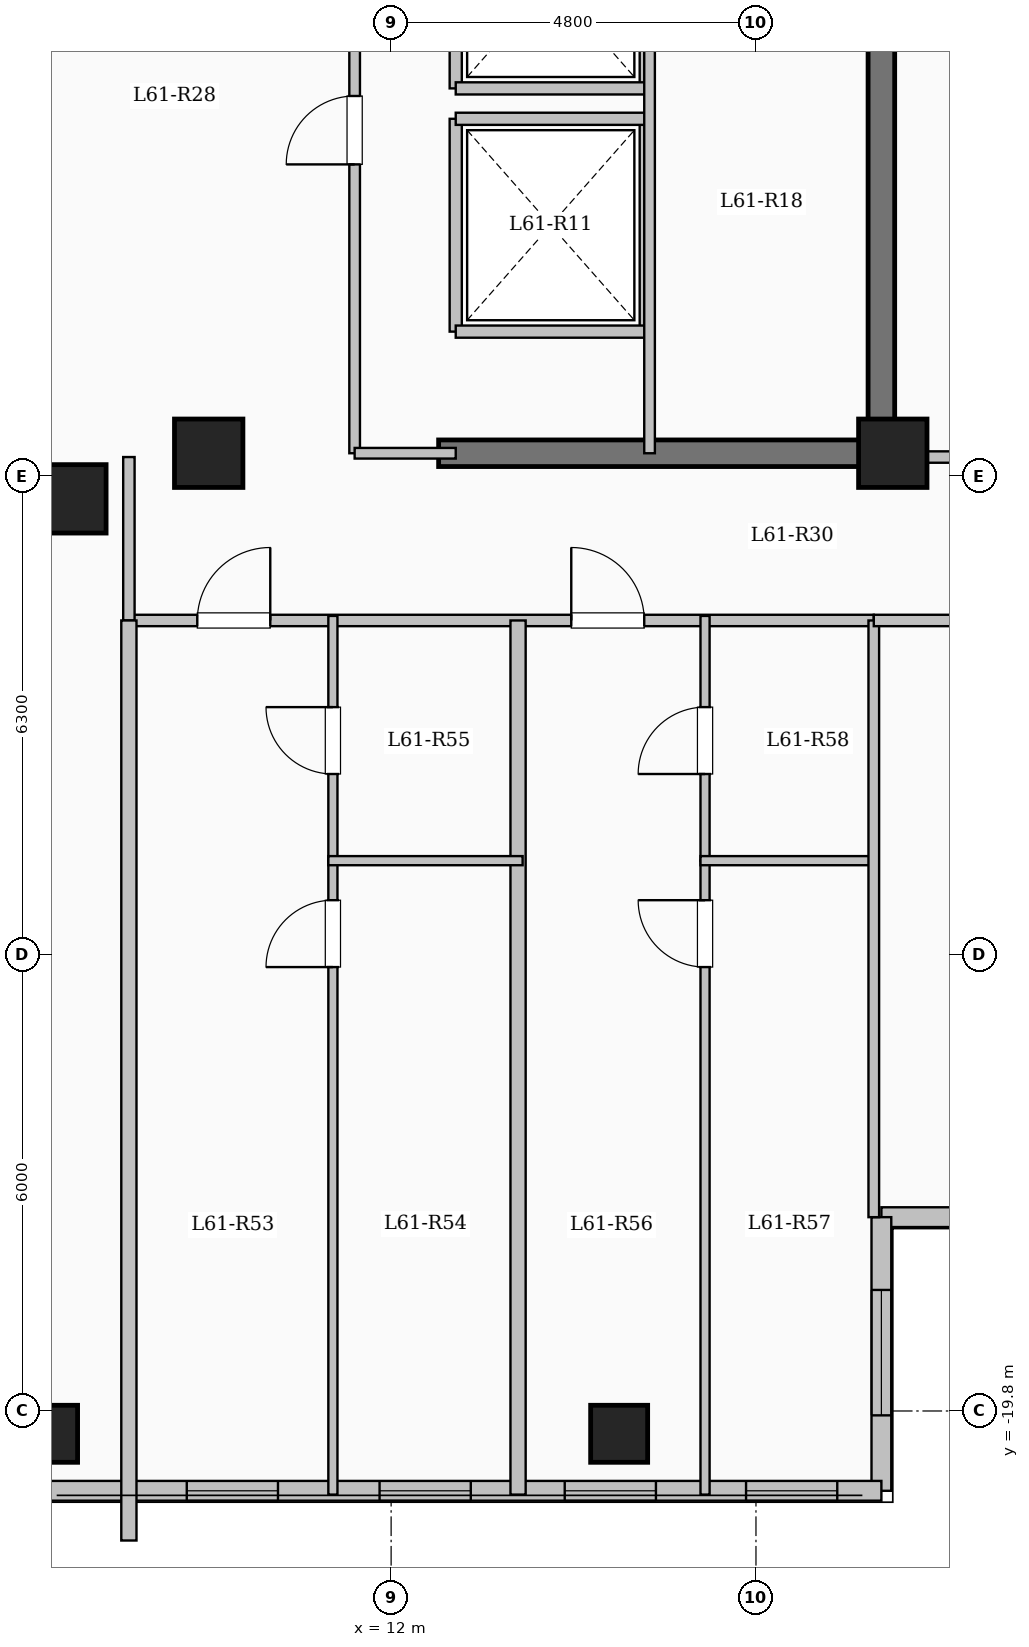
"""IFC4 building model, lengths in metres.
Left out: names, types, materials, properties, quantities, classifications, styles, units other than length and angle.
Written with IfcOpenShell. Run it as: python <this file> out.ifc"""

import sys

from ifc_helpers import new_model, si_unit, direction, frame, frame_2d, origin, origin_2d, place, context, subcontext, project, spatial, rectangle, extrude, element, fill, save


model = new_model("IFC4")
c1 = context("Model", 3, precision=1e-05, world=origin(), true_north=direction((0.0, 1.0)))
c2 = subcontext(c1, "Body", "Model", "MODEL_VIEW")
j1 = project(units=[si_unit("LENGTHUNIT", "METRE"), si_unit("PLANEANGLEUNIT", "RADIAN")], contexts=[c1])
p1 = place(None, origin())
s1 = spatial("IfcSite", under=j1, at=p1, CompositionType="ELEMENT")
p2 = place(p1, origin())
s2 = spatial("IfcBuilding", under=s1, at=p2, CompositionType="ELEMENT")
p3 = place(p2, frame((0.0, 0.0, 223.75)))
s3 = spatial("IfcBuildingStorey", under=s2, at=p3, CompositionType="ELEMENT", Elevation=223.75)
for number, where, z_axis, x_axis in (
    (1, (7.8, -7.8, 0.0), (0.0, 0.0, 1.0), (1.0, 0.0, 0.0)),
    (2, (9.6, -7.2, 0.0), (0.0, 0.0, 1.0), (1.0, 0.0, 0.0)),
    (3, (18.6, -7.2, 0.0), (0.0, 0.0, 1.0), (1.0, 0.0, 0.0)),
):
    element("IfcColumn", number, at=place(p3, frame(where, z_axis=z_axis, x_axis=x_axis)), inside=s3, PredefinedType="COLUMN", context=c2, shape_type="SweptSolid", body=[
        extrude(rectangle(XDim=0.9, YDim=0.9, at=origin_2d()), origin(), (0.0, 0.0, 1.0), 3.35),
    ])
for number, where, z_axis, x_axis in (
    (4, (7.5, -20.1, 0.0), (0.0, 0.0, 1.0), (1.0, 0.0, 0.0)),
    (5, (15.0, -20.1, 0.0), (0.0, 0.0, 1.0), (1.0, 0.0, 0.0)),
):
    element("IfcColumn", number, at=place(p3, frame(where, z_axis=z_axis, x_axis=x_axis)), inside=s3, PredefinedType="COLUMN", context=c2, shape_type="SweptSolid", body=[
        extrude(rectangle(XDim=0.75, YDim=0.75, at=origin_2d()), origin(), (0.0, 0.0, 1.0), 3.35),
    ])
p4 = place(p3, frame((23.55, -17.25, 0.0), z_axis=(0.0, 0.0, 1.0), x_axis=(-1.0, 0.0, 0.0)))
e6 = element("IfcWall", 6, at=p4, inside=s3, PredefinedType="SOLIDWALL", context=c2, shape_type="SweptSolid", body=[
    extrude(rectangle(XDim=5.1, YDim=0.26, at=frame_2d((2.55, 0.0))), origin(), (0.0, 0.0, 1.0), 3.05),
])
p5 = place(p4, frame((1.475, 0.0, 0.9)))
e7 = element("IfcOpeningElement", 7, at=p5, cuts=e6, PredefinedType="OPENING", context=c2, shape_type="SweptSolid", body=[
    extrude(rectangle(XDim=2.2, YDim=1.75, at=frame_2d((1.1, 0.875))), frame((0.0, 0.14, 0.0), z_axis=(0.0, -1.0, 0.0), x_axis=(1.0, 0.0, 0.0)), (0.0, 0.0, 1.0), 0.28),
])
p6 = place(p3, frame((18.45, -17.25, 0.0), z_axis=(0.0, 0.0, 1.0), x_axis=(0.0, -1.0, 0.0)))
e8 = element("IfcWall", 8, at=p6, inside=s3, PredefinedType="SOLIDWALL", context=c2, shape_type="SweptSolid", body=[
    extrude(rectangle(XDim=3.6, YDim=0.26, at=frame_2d((1.8, 0.0))), origin(), (0.0, 0.0, 1.0), 3.05),
])
p7 = place(p6, frame((0.958, 0.0, 0.9)))
e9 = element("IfcOpeningElement", 9, at=p7, cuts=e8, PredefinedType="OPENING", context=c2, shape_type="SweptSolid", body=[
    extrude(rectangle(XDim=1.65, YDim=1.6, at=frame_2d((0.825, 0.8))), frame((0.0, 0.14, 0.0), z_axis=(0.0, -1.0, 0.0), x_axis=(1.0, 0.0, 0.0)), (0.0, 0.0, 1.0), 0.28),
])
p8 = place(p3, frame((18.45, -20.85, 0.0), z_axis=(0.0, 0.0, 1.0), x_axis=(-1.0, 0.0, 0.0)))
e10 = element("IfcWall", 10, at=p8, inside=s3, PredefinedType="SOLIDWALL", context=c2, shape_type="SweptSolid", body=[
    extrude(rectangle(XDim=11.1, YDim=0.26, at=frame_2d((5.55, 0.0))), origin(), (0.0, 0.0, 1.0), 3.05),
])
p9 = place(p8, frame((0.581, 0.0, 0.95)))
e11 = element("IfcOpeningElement", 11, at=p9, cuts=e10, PredefinedType="OPENING", context=c2, shape_type="SweptSolid", body=[
    extrude(rectangle(XDim=1.2, YDim=1.5, at=frame_2d((0.6, 0.75))), frame((0.0, 0.14, 0.0), z_axis=(0.0, -1.0, 0.0), x_axis=(1.0, 0.0, 0.0)), (0.0, 0.0, 1.0), 0.28),
])
p10 = place(p8, frame((2.966, 0.0, 0.95)))
e12 = element("IfcOpeningElement", 12, at=p10, cuts=e10, PredefinedType="OPENING", context=c2, shape_type="SweptSolid", body=[
    extrude(rectangle(XDim=1.2, YDim=1.5, at=frame_2d((0.6, 0.75))), frame((0.0, 0.14, 0.0), z_axis=(0.0, -1.0, 0.0), x_axis=(1.0, 0.0, 0.0)), (0.0, 0.0, 1.0), 0.28),
])
p11 = place(p8, frame((5.402, 0.0, 0.95)))
e13 = element("IfcOpeningElement", 13, at=p11, cuts=e10, PredefinedType="OPENING", context=c2, shape_type="SweptSolid", body=[
    extrude(rectangle(XDim=1.2, YDim=1.5, at=frame_2d((0.6, 0.75))), frame((0.0, 0.14, 0.0), z_axis=(0.0, -1.0, 0.0), x_axis=(1.0, 0.0, 0.0)), (0.0, 0.0, 1.0), 0.28),
])
p12 = place(p8, frame((7.938, 0.0, 0.95)))
e14 = element("IfcOpeningElement", 14, at=p12, cuts=e10, PredefinedType="OPENING", context=c2, shape_type="SweptSolid", body=[
    extrude(rectangle(XDim=1.2, YDim=1.5, at=frame_2d((0.6, 0.75))), frame((0.0, 0.14, 0.0), z_axis=(0.0, -1.0, 0.0), x_axis=(1.0, 0.0, 0.0)), (0.0, 0.0, 1.0), 0.28),
])
for number, where, z_axis, x_axis in (
    (15, (12.85, -5.6, 0.0), (0.0, 0.0, 1.0), (0.0, 1.0, 0.0)),
    (16, (15.35, -5.6, 0.0), (0.0, 0.0, 1.0), (0.0, 1.0, 0.0)),
):
    element("IfcWall", number, at=place(p3, frame(where, z_axis=z_axis, x_axis=x_axis)), inside=s3, PredefinedType="SOLIDWALL", context=c2, shape_type="SweptSolid", body=[
        extrude(rectangle(XDim=2.8, YDim=0.16, at=frame_2d((1.4, 0.0))), origin(), (0.0, 0.0, 1.0), 3.05),
    ])
for number, where, z_axis, x_axis in (
    (17, (12.85, -5.6, 0.0), (0.0, 0.0, 1.0), (1.0, 0.0, 0.0)),
    (18, (12.85, -2.8, 0.0), (0.0, 0.0, 1.0), (1.0, 0.0, 0.0)),
):
    element("IfcWall", number, at=place(p3, frame(where, z_axis=z_axis, x_axis=x_axis)), inside=s3, PredefinedType="SOLIDWALL", context=c2, shape_type="SweptSolid", body=[
        extrude(rectangle(XDim=2.5, YDim=0.16, at=frame_2d((1.25, 0.0))), origin(), (0.0, 0.0, 1.0), 3.05),
    ])
for number, where, z_axis, x_axis in (
    (19, (12.85, -2.4, 0.0), (0.0, 0.0, 1.0), (0.0, 1.0, 0.0)),
    (20, (15.35, -2.4, 0.0), (0.0, 0.0, 1.0), (0.0, 1.0, 0.0)),
):
    element("IfcWall", number, at=place(p3, frame(where, z_axis=z_axis, x_axis=x_axis)), inside=s3, PredefinedType="SOLIDWALL", context=c2, shape_type="SweptSolid", body=[
        extrude(rectangle(XDim=2.8, YDim=0.16, at=frame_2d((1.4, 0.0))), origin(), (0.0, 0.0, 1.0), 3.05),
    ])
p13 = place(p3, frame((12.85, -2.4, 0.0), z_axis=(0.0, 0.0, 1.0), x_axis=(1.0, 0.0, 0.0)))
e21 = element("IfcWall", 21, at=p13, inside=s3, PredefinedType="SOLIDWALL", context=c2, shape_type="SweptSolid", body=[
    extrude(rectangle(XDim=2.5, YDim=0.16, at=frame_2d((1.25, 0.0))), origin(), (0.0, 0.0, 1.0), 3.05),
])
p14 = place(p3, frame((18.45, -7.375, 0.0), z_axis=(0.0, 0.0, 1.0), x_axis=(0.0, 1.0, 0.0)))
e22 = element("IfcWall", 22, at=p14, inside=s3, PredefinedType="SHEAR", context=c2, shape_type="SweptSolid", body=[
    extrude(rectangle(XDim=14.05, YDim=0.35, at=frame_2d((7.025, 0.0))), origin(), (0.0, 0.0, 1.0), 3.35),
])
p15 = place(p3, frame((12.625, -7.2, 0.0), z_axis=(0.0, 0.0, 1.0), x_axis=(1.0, 0.0, 0.0)))
e23 = element("IfcWall", 23, at=p15, inside=s3, PredefinedType="SHEAR", context=c2, shape_type="SweptSolid", body=[
    extrude(rectangle(XDim=6.0, YDim=0.35, at=frame_2d((3.0, 0.0))), origin(), (0.0, 0.0, 1.0), 3.35),
])
p16 = place(p3, frame((15.4, -7.2, 0.0), z_axis=(0.0, 0.0, 1.0), x_axis=(0.0, 1.0, 0.0)))
e24 = element("IfcWall", 24, at=p16, inside=s3, PredefinedType="PARTITIONING", context=c2, shape_type="SweptSolid", body=[
    extrude(rectangle(XDim=10.45, YDim=0.14, at=frame_2d((5.225, 0.0))), origin(), (0.0, 0.0, 1.0), 3.05),
])
p17 = place(p16, frame((9.25, 0.0, 0.0)))
e25 = element("IfcOpeningElement", 25, at=p17, cuts=e24, PredefinedType="OPENING", context=c2, shape_type="SweptSolid", body=[
    extrude(rectangle(XDim=0.9, YDim=2.08, at=frame_2d((0.45, 1.04))), frame((0.0, 0.08, 0.0), z_axis=(0.0, -1.0, 0.0), x_axis=(1.0, 0.0, 0.0)), (0.0, 0.0, 1.0), 0.16),
])
p18 = place(p3, frame((11.52, -7.2, 0.0), z_axis=(0.0, 0.0, 1.0), x_axis=(0.0, 1.0, 0.0)))
e26 = element("IfcWall", 26, at=p18, inside=s3, PredefinedType="PARTITIONING", context=c2, shape_type="SweptSolid", body=[
    extrude(rectangle(XDim=9.12, YDim=0.14, at=frame_2d((4.56, 0.0))), origin(), (0.0, 0.0, 1.0), 3.05),
])
p19 = place(p18, frame((3.8, 0.0, 0.0)))
e27 = element("IfcOpeningElement", 27, at=p19, cuts=e26, PredefinedType="OPENING", context=c2, shape_type="SweptSolid", body=[
    extrude(rectangle(XDim=0.9, YDim=2.08, at=frame_2d((0.45, 1.04))), frame((0.0, 0.08, 0.0), z_axis=(0.0, -1.0, 0.0), x_axis=(1.0, 0.0, 0.0)), (0.0, 0.0, 1.0), 0.16),
])
p20 = place(p3, frame((11.52, -7.2, 0.0), z_axis=(0.0, 0.0, 1.0), x_axis=(1.0, 0.0, 0.0)))
e28 = element("IfcWall", 28, at=p20, inside=s3, PredefinedType="PARTITIONING", context=c2, shape_type="SweptSolid", body=[
    extrude(rectangle(XDim=1.33, YDim=0.14, at=frame_2d((0.665, 0.0))), origin(), (0.0, 0.0, 1.0), 2.22),
])
p21 = place(p3, frame((8.55, -9.4, 0.0), z_axis=(0.0, 0.0, 1.0), x_axis=(1.0, 0.0, 0.0)))
e29 = element("IfcWall", 29, at=p21, inside=s3, PredefinedType="PARTITIONING", context=c2, shape_type="SweptSolid", body=[
    extrude(rectangle(XDim=9.8, YDim=0.15, at=frame_2d((4.9, 0.0))), origin(), (0.0, 0.0, 1.0), 3.05),
])
p22 = place(p21, frame((0.9, 0.0, 0.0)))
e30 = element("IfcOpeningElement", 30, at=p22, cuts=e29, PredefinedType="OPENING", context=c2, shape_type="SweptSolid", body=[
    extrude(rectangle(XDim=0.96, YDim=2.15, at=frame_2d((0.48, 1.075))), frame((0.0, 0.085, 0.0), z_axis=(0.0, -1.0, 0.0), x_axis=(1.0, 0.0, 0.0)), (0.0, 0.0, 1.0), 0.17),
])
p23 = place(p21, frame((5.82, 0.0, 0.0)))
e31 = element("IfcOpeningElement", 31, at=p23, cuts=e29, PredefinedType="OPENING", context=c2, shape_type="SweptSolid", body=[
    extrude(rectangle(XDim=0.96, YDim=2.15, at=frame_2d((0.48, 1.075))), frame((0.0, 0.085, 0.0), z_axis=(0.0, -1.0, 0.0), x_axis=(1.0, 0.0, 0.0)), (0.0, 0.0, 1.0), 0.17),
])
p24 = place(p3, frame((8.55, -9.4, 0.0), z_axis=(0.0, 0.0, 1.0), x_axis=(0.0, 1.0, 0.0)))
e32 = element("IfcWall", 32, at=p24, inside=s3, PredefinedType="PARTITIONING", context=c2, shape_type="SweptSolid", body=[
    extrude(rectangle(XDim=2.15, YDim=0.15, at=frame_2d((1.075, 0.0))), origin(), (0.0, 0.0, 1.0), 3.05),
])
p25 = place(p3, frame((13.67, -20.9, 0.0), z_axis=(0.0, 0.0, 1.0), x_axis=(0.0, 1.0, 0.0)))
e33 = element("IfcWall", 33, at=p25, inside=s3, PredefinedType="SOLIDWALL", context=c2, shape_type="SweptSolid", body=[
    extrude(rectangle(XDim=11.5, YDim=0.2, at=frame_2d((5.75, 0.0))), origin(), (0.0, 0.0, 1.0), 3.05),
])
p26 = place(p3, frame((11.234, -20.9, 0.0), z_axis=(0.0, 0.0, 1.0), x_axis=(0.0, 1.0, 0.0)))
e34 = element("IfcWall", 34, at=p26, inside=s3, PredefinedType="PARTITIONING", context=c2, shape_type="SweptSolid", body=[
    extrude(rectangle(XDim=8.34, YDim=0.12, at=frame_2d((4.17, 0.0))), origin(), (0.0, 0.0, 1.0), 3.05),
])
p27 = place(p26, frame((6.94, 0.0, 0.0)))
e35 = element("IfcOpeningElement", 35, at=p27, cuts=e34, PredefinedType="OPENING", context=c2, shape_type="SweptSolid", body=[
    extrude(rectangle(XDim=0.88, YDim=2.1, at=frame_2d((0.44, 1.05))), frame((0.0, 0.07, 0.0), z_axis=(0.0, -1.0, 0.0), x_axis=(1.0, 0.0, 0.0)), (0.0, 0.0, 1.0), 0.14),
])
p28 = place(p3, frame((11.234, -12.56, 0.0), z_axis=(0.0, 0.0, 1.0), x_axis=(0.0, 1.0, 0.0)))
e36 = element("IfcWall", 36, at=p28, inside=s3, PredefinedType="PARTITIONING", context=c2, shape_type="SweptSolid", body=[
    extrude(rectangle(XDim=3.22, YDim=0.12, at=frame_2d((1.61, 0.0))), origin(), (0.0, 0.0, 1.0), 3.05),
])
p29 = place(p28, frame((1.14, 0.0, 0.0)))
e37 = element("IfcOpeningElement", 37, at=p29, cuts=e36, PredefinedType="OPENING", context=c2, shape_type="SweptSolid", body=[
    extrude(rectangle(XDim=0.88, YDim=2.1, at=frame_2d((0.44, 1.05))), frame((0.0, 0.07, 0.0), z_axis=(0.0, -1.0, 0.0), x_axis=(1.0, 0.0, 0.0)), (0.0, 0.0, 1.0), 0.14),
])
p30 = place(p3, frame((11.174, -12.56, 0.0), z_axis=(0.0, 0.0, 1.0), x_axis=(1.0, 0.0, 0.0)))
e38 = element("IfcWall", 38, at=p30, inside=s3, PredefinedType="PARTITIONING", context=c2, shape_type="SweptSolid", body=[
    extrude(rectangle(XDim=2.556, YDim=0.12, at=frame_2d((1.278, 0.0))), origin(), (0.0, 0.0, 1.0), 2.675),
])
p31 = place(p3, frame((16.13, -20.9, 0.0), z_axis=(0.0, 0.0, 1.0), x_axis=(0.0, 1.0, 0.0)))
e39 = element("IfcWall", 39, at=p31, inside=s3, PredefinedType="PARTITIONING", context=c2, shape_type="SweptSolid", body=[
    extrude(rectangle(XDim=8.34, YDim=0.12, at=frame_2d((4.17, 0.0))), origin(), (0.0, 0.0, 1.0), 3.05),
])
p32 = place(p31, frame((6.94, 0.0, 0.0)))
e40 = element("IfcOpeningElement", 40, at=p32, cuts=e39, PredefinedType="OPENING", context=c2, shape_type="SweptSolid", body=[
    extrude(rectangle(XDim=0.88, YDim=2.1, at=frame_2d((0.44, 1.05))), frame((0.0, 0.07, 0.0), z_axis=(0.0, -1.0, 0.0), x_axis=(1.0, 0.0, 0.0)), (0.0, 0.0, 1.0), 0.14),
])
p33 = place(p3, frame((16.13, -12.56, 0.0), z_axis=(0.0, 0.0, 1.0), x_axis=(0.0, 1.0, 0.0)))
e41 = element("IfcWall", 41, at=p33, inside=s3, PredefinedType="PARTITIONING", context=c2, shape_type="SweptSolid", body=[
    extrude(rectangle(XDim=3.22, YDim=0.12, at=frame_2d((1.61, 0.0))), origin(), (0.0, 0.0, 1.0), 3.05),
])
p34 = place(p33, frame((1.14, 0.0, 0.0)))
e42 = element("IfcOpeningElement", 42, at=p34, cuts=e41, PredefinedType="OPENING", context=c2, shape_type="SweptSolid", body=[
    extrude(rectangle(XDim=0.88, YDim=2.1, at=frame_2d((0.44, 1.05))), frame((0.0, 0.07, 0.0), z_axis=(0.0, -1.0, 0.0), x_axis=(1.0, 0.0, 0.0)), (0.0, 0.0, 1.0), 0.14),
])
p35 = place(p3, frame((16.07, -12.56, 0.0), z_axis=(0.0, 0.0, 1.0), x_axis=(1.0, 0.0, 0.0)))
e43 = element("IfcWall", 43, at=p35, inside=s3, PredefinedType="PARTITIONING", context=c2, shape_type="SweptSolid", body=[
    extrude(rectangle(XDim=2.34, YDim=0.12, at=frame_2d((1.17, 0.0))), origin(), (0.0, 0.0, 1.0), 3.05),
])
p36 = place(p3, frame((8.55, -21.504, 0.0), z_axis=(0.0, 0.0, 1.0), x_axis=(0.0, 1.0, 0.0)))
e44 = element("IfcWall", 44, at=p36, inside=s3, PredefinedType="SOLIDWALL", context=c2, shape_type="SweptSolid", body=[
    extrude(rectangle(XDim=12.104, YDim=0.2, at=frame_2d((6.052, 0.0))), origin(), (0.0, 0.0, 1.0), 3.05),
])
p37 = place(p3, frame((18.45, -7.25, 0.0), z_axis=(0.0, 0.0, 1.0), x_axis=(1.0, 0.0, 0.0)))
e45 = element("IfcWall", 45, at=p37, inside=s3, PredefinedType="PARTITIONING", context=c2, shape_type="SweptSolid", body=[
    extrude(rectangle(XDim=5.13, YDim=0.15, at=frame_2d((2.565, 0.0))), origin(), (0.0, 0.0, 1.0), 3.05),
])
p38 = place(p37, frame((1.95, 0.0, 0.0)))
e46 = element("IfcOpeningElement", 46, at=p38, cuts=e45, PredefinedType="OPENING", context=c2, shape_type="SweptSolid", body=[
    extrude(rectangle(XDim=0.96, YDim=2.15, at=frame_2d((0.48, 1.075))), frame((0.0, 0.085, 0.0), z_axis=(0.0, -1.0, 0.0), x_axis=(1.0, 0.0, 0.0)), (0.0, 0.0, 1.0), 0.17),
])
p39 = place(p3, frame((18.35, -17.25, 0.0), z_axis=(0.0, 0.0, 1.0), x_axis=(0.0, 1.0, 0.0)))
e47 = element("IfcWall", 47, at=p39, inside=s3, PredefinedType="PARTITIONING", context=c2, shape_type="SweptSolid", body=[
    extrude(rectangle(XDim=7.85, YDim=0.14, at=frame_2d((3.925, 0.0))), origin(), (0.0, 0.0, 1.0), 3.05),
])
p40 = place(p3, frame((18.35, -9.4, 0.0), z_axis=(0.0, 0.0, 1.0), x_axis=(1.0, 0.0, 0.0)))
e48 = element("IfcWall", 48, at=p40, inside=s3, PredefinedType="PARTITIONING", context=c2, shape_type="SweptSolid", body=[
    extrude(rectangle(XDim=5.23, YDim=0.15, at=frame_2d((2.615, 0.0))), origin(), (0.0, 0.0, 1.0), 3.05),
])
p41 = place(p40, frame((2.14, 0.0, 0.0)))
e49 = element("IfcOpeningElement", 49, at=p41, cuts=e48, PredefinedType="OPENING", context=c2, shape_type="SweptSolid", body=[
    extrude(rectangle(XDim=0.95, YDim=2.15, at=frame_2d((0.475, 1.075))), frame((0.0, 0.085, 0.0), z_axis=(0.0, -1.0, 0.0), x_axis=(1.0, 0.0, 0.0)), (0.0, 0.0, 1.0), 0.17),
])
p42 = place(p7, origin())
e50 = element("IfcWindow", 50, at=p42, inside=s3, PartitioningType="SINGLE_PANEL", PredefinedType="WINDOW", context=c2, shape_type="SweptSolid", body=[
    extrude(rectangle(XDim=1.65, YDim=1.6, at=frame_2d((0.825, 0.8))), frame((0.0, 0.03, 0.0), z_axis=(0.0, -1.0, 0.0), x_axis=(1.0, 0.0, 0.0)), (0.0, 0.0, 1.0), 0.06),
])
fill(e9, e50)
p43 = place(p9, origin())
e51 = element("IfcWindow", 51, at=p43, inside=s3, PartitioningType="SINGLE_PANEL", PredefinedType="WINDOW", context=c2, shape_type="SweptSolid", body=[
    extrude(rectangle(XDim=1.2, YDim=1.5, at=frame_2d((0.6, 0.75))), frame((0.0, 0.03, 0.0), z_axis=(0.0, -1.0, 0.0), x_axis=(1.0, 0.0, 0.0)), (0.0, 0.0, 1.0), 0.06),
])
fill(e11, e51)
p44 = place(p10, origin())
e52 = element("IfcWindow", 52, at=p44, inside=s3, PartitioningType="SINGLE_PANEL", PredefinedType="WINDOW", context=c2, shape_type="SweptSolid", body=[
    extrude(rectangle(XDim=1.2, YDim=1.5, at=frame_2d((0.6, 0.75))), frame((0.0, 0.03, 0.0), z_axis=(0.0, -1.0, 0.0), x_axis=(1.0, 0.0, 0.0)), (0.0, 0.0, 1.0), 0.06),
])
fill(e12, e52)
p45 = place(p11, origin())
e53 = element("IfcWindow", 53, at=p45, inside=s3, PartitioningType="SINGLE_PANEL", PredefinedType="WINDOW", context=c2, shape_type="SweptSolid", body=[
    extrude(rectangle(XDim=1.2, YDim=1.5, at=frame_2d((0.6, 0.75))), frame((0.0, 0.03, 0.0), z_axis=(0.0, -1.0, 0.0), x_axis=(1.0, 0.0, 0.0)), (0.0, 0.0, 1.0), 0.06),
])
fill(e13, e53)
p46 = place(p12, origin())
e54 = element("IfcWindow", 54, at=p46, inside=s3, PartitioningType="SINGLE_PANEL", PredefinedType="WINDOW", context=c2, shape_type="SweptSolid", body=[
    extrude(rectangle(XDim=1.2, YDim=1.5, at=frame_2d((0.6, 0.75))), frame((0.0, 0.03, 0.0), z_axis=(0.0, -1.0, 0.0), x_axis=(1.0, 0.0, 0.0)), (0.0, 0.0, 1.0), 0.06),
])
fill(e14, e54)
p47 = place(p19, origin())
e55 = element("IfcDoor", 55, at=p47, inside=s3, OperationType="SINGLE_SWING_LEFT", PredefinedType="DOOR", context=c2, shape_type="SweptSolid", body=[
    extrude(rectangle(XDim=0.9, YDim=2.08, at=frame_2d((0.45, 1.04))), frame((0.0, 0.025, 0.0), z_axis=(0.0, -1.0, 0.0), x_axis=(1.0, 0.0, 0.0)), (0.0, 0.0, 1.0), 0.05),
])
fill(e27, e55)
p48 = place(p22, origin())
e56 = element("IfcDoor", 56, at=p48, inside=s3, OperationType="SINGLE_SWING_RIGHT", PredefinedType="DOOR", context=c2, shape_type="SweptSolid", body=[
    extrude(rectangle(XDim=0.96, YDim=2.15, at=frame_2d((0.48, 1.075))), frame((0.0, 0.025, 0.0), z_axis=(0.0, -1.0, 0.0), x_axis=(1.0, 0.0, 0.0)), (0.0, 0.0, 1.0), 0.05),
])
fill(e30, e56)
p49 = place(p27, origin())
e57 = element("IfcDoor", 57, at=p49, inside=s3, OperationType="SINGLE_SWING_LEFT", PredefinedType="DOOR", context=c2, shape_type="SweptSolid", body=[
    extrude(rectangle(XDim=0.88, YDim=2.1, at=frame_2d((0.44, 1.05))), frame((0.0, 0.025, 0.0), z_axis=(0.0, -1.0, 0.0), x_axis=(1.0, 0.0, 0.0)), (0.0, 0.0, 1.0), 0.05),
])
fill(e35, e57)
p50 = place(p29, origin())
e58 = element("IfcDoor", 58, at=p50, inside=s3, OperationType="SINGLE_SWING_RIGHT", PredefinedType="DOOR", context=c2, shape_type="SweptSolid", body=[
    extrude(rectangle(XDim=0.88, YDim=2.1, at=frame_2d((0.44, 1.05))), frame((0.0, 0.025, 0.0), z_axis=(0.0, -1.0, 0.0), x_axis=(1.0, 0.0, 0.0)), (0.0, 0.0, 1.0), 0.05),
])
fill(e37, e58)
p51 = place(p23, origin())
e59 = element("IfcDoor", 59, at=p51, inside=s3, OperationType="SINGLE_SWING_LEFT", PredefinedType="DOOR", context=c2, shape_type="SweptSolid", body=[
    extrude(rectangle(XDim=0.96, YDim=2.15, at=frame_2d((0.48, 1.075))), frame((0.0, 0.025, 0.0), z_axis=(0.0, -1.0, 0.0), x_axis=(1.0, 0.0, 0.0)), (0.0, 0.0, 1.0), 0.05),
])
fill(e31, e59)
p52 = place(p32, origin())
e60 = element("IfcDoor", 60, at=p52, inside=s3, OperationType="SINGLE_SWING_RIGHT", PredefinedType="DOOR", context=c2, shape_type="SweptSolid", body=[
    extrude(rectangle(XDim=0.88, YDim=2.1, at=frame_2d((0.44, 1.05))), frame((0.0, 0.025, 0.0), z_axis=(0.0, -1.0, 0.0), x_axis=(1.0, 0.0, 0.0)), (0.0, 0.0, 1.0), 0.05),
])
fill(e40, e60)
p53 = place(p34, origin())
e61 = element("IfcDoor", 61, at=p53, inside=s3, OperationType="SINGLE_SWING_LEFT", PredefinedType="DOOR", context=c2, shape_type="SweptSolid", body=[
    extrude(rectangle(XDim=0.88, YDim=2.1, at=frame_2d((0.44, 1.05))), frame((0.0, 0.025, 0.0), z_axis=(0.0, -1.0, 0.0), x_axis=(1.0, 0.0, 0.0)), (0.0, 0.0, 1.0), 0.05),
])
fill(e42, e61)
save(model, sys.argv[1])
